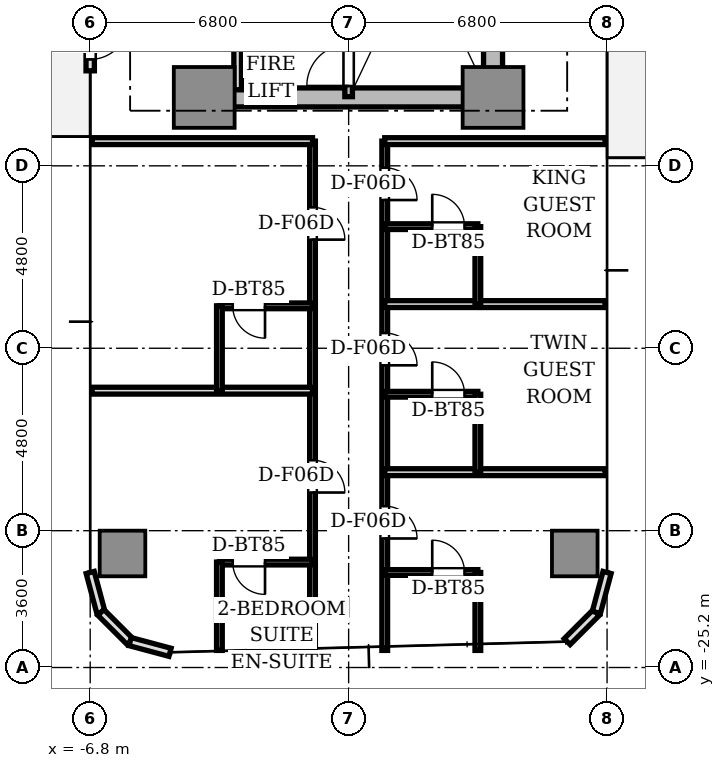
"""IFC4 building model, lengths in metres.
Left out: names, types, materials, properties, quantities, classifications, styles, units other than length and angle.
Written with IfcOpenShell. Run it as: python <this file> out.ifc"""

import sys

from ifc_helpers import new_model, si_unit, direction, frame, frame_2d, origin, origin_2d, place, context, subcontext, project, spatial, rectangle, extrude, source, transform, mapped, element, fill, save


model = new_model("IFC4")
c1 = context("Model", 3, precision=1e-05, world=origin(), true_north=direction((0.0, 1.0)))
c2 = subcontext(c1, "Body", "Model", "MODEL_VIEW")
j1 = project(units=[si_unit("LENGTHUNIT", "METRE"), si_unit("PLANEANGLEUNIT", "RADIAN")], contexts=[c1])
p1 = place(None, origin())
s1 = spatial("IfcSite", under=j1, at=p1, CompositionType="ELEMENT")
p2 = place(p1, origin())
s2 = spatial("IfcBuilding", under=s1, at=p2, CompositionType="ELEMENT")
p3 = place(p2, frame((0.0, 0.0, 64.45)))
s3 = spatial("IfcBuildingStorey", under=s2, at=p3, CompositionType="ELEMENT", Elevation=64.45)
p4 = place(p3, frame((-3.55, -10.2, 0.0), z_axis=(0.0, 0.0, 1.0), x_axis=(1.0, 0.0, 0.0)))
e1 = element("IfcWall", 1, at=p4, inside=s3, PredefinedType="SHEAR", context=c2, shape_type="SweptSolid", body=[
    extrude(rectangle(XDim=7.1, YDim=0.5, at=frame_2d((3.55, 0.0))), origin(), (0.0, 0.0, 1.0), 3.11),
])
p5 = place(p3, frame((3.8, -9.75, 0.0), z_axis=(0.0, 0.0, 1.0), x_axis=(0.0, 1.0, 0.0)))
e2 = element("IfcWall", 2, at=p5, inside=s3, PredefinedType="SHEAR", context=c2, shape_type="SweptSolid", body=[
    extrude(rectangle(XDim=6.9, YDim=0.5, at=frame_2d((3.45, 0.0))), origin(), (0.0, 0.0, 1.0), 3.11),
])
m1 = source(origin(), c2, "Body", "SweptSolid", [
    extrude(rectangle(XDim=1.6, YDim=1.6, at=origin_2d()), origin(), (0.0, 0.0, 1.0), 3.11),
])
for number, where, z_axis, x_axis in (
    (3, (-3.8, -10.2, 0.0), (0.0, 0.0, 1.0), (1.0, 0.0, 0.0)),
    (4, (3.8, -10.2, 0.0), (0.0, 0.0, 1.0), (1.0, 0.0, 0.0)),
):
    element("IfcColumn", number, at=place(p3, frame(where, z_axis=z_axis, x_axis=x_axis)), inside=s3, PredefinedType="COLUMN", context=c2, shape_type="MappedRepresentation", body=[
        mapped(m1, transform((0.0, 0.0, 0.0), scale=1.0)),
    ])
m2 = source(origin(), c2, "Body", "SweptSolid", [
    extrude(rectangle(XDim=1.2, YDim=1.2, at=origin_2d()), origin(), (0.0, 0.0, 1.0), 3.11),
])
for number, where, z_axis, x_axis in (
    (5, (-5.95, -22.2, 0.0), (0.0, 0.0, 1.0), (1.0, 0.0, 0.0)),
    (6, (5.95, -22.2, 0.0), (0.0, 0.0, 1.0), (1.0, 0.0, 0.0)),
):
    element("IfcColumn", number, at=place(p3, frame(where, z_axis=z_axis, x_axis=x_axis)), inside=s3, PredefinedType="COLUMN", context=c2, shape_type="MappedRepresentation", body=[
        mapped(m2, transform((0.0, 0.0, 0.0), scale=1.0)),
    ])
p6 = place(p3, frame((-6.8, -6.8, 0.0), z_axis=(0.0, 0.0, 1.0), x_axis=(0.0, -1.0, 0.0)))
e7 = element("IfcWall", 7, at=p6, inside=s3, PredefinedType="STANDARD", context=c2, shape_type="SweptSolid", body=[
    extrude(rectangle(XDim=2.7, YDim=0.22, at=frame_2d((1.35, 0.0))), origin(), (0.0, 0.0, 1.0), 3.11),
])
p7 = place(p6, frame((1.4, 0.0, 0.0)))
e8 = element("IfcOpeningElement", 8, at=p7, cuts=e7, PredefinedType="OPENING", context=c2, shape_type="SweptSolid", body=[
    extrude(rectangle(XDim=1.0, YDim=2.2, at=frame_2d((0.5, 1.1))), frame((0.0, 0.12, 0.0), z_axis=(0.0, -1.0, 0.0), x_axis=(1.0, 0.0, 0.0)), (0.0, 0.0, 1.0), 0.24),
])
for number, where, z_axis, x_axis in (
    (9, (-6.8, -22.7, 0.0), (0.0, 0.0, 1.0), (0.259, -0.966, 0.0)),
    (10, (-6.519, -23.75, 0.0), (0.0, 0.0, 1.0), (0.707, -0.707, 0.0)),
    (11, (-5.75, -24.519, 0.0), (0.0, 0.0, 1.0), (0.966, -0.259, 0.0)),
    (12, (5.75, -24.519, 0.0), (0.0, 0.0, 1.0), (0.707, 0.707, 0.0)),
    (13, (6.519, -23.75, 0.0), (0.0, 0.0, 1.0), (0.259, 0.966, 0.0)),
):
    element("IfcWall", number, at=place(p3, frame(where, z_axis=z_axis, x_axis=x_axis)), inside=s3, PredefinedType="STANDARD", context=c2, shape_type="SweptSolid", body=[
        extrude(rectangle(XDim=1.087, YDim=0.22, at=frame_2d((0.543, 0.0))), origin(), (0.0, 0.0, 1.0), 3.11),
    ])
p8 = place(p3, frame((0.0, -10.18, 0.0), z_axis=(0.0, 0.0, 1.0), x_axis=(0.0, 1.0, 0.0)))
e14 = element("IfcWall", 14, at=p8, inside=s3, PredefinedType="SOLIDWALL", context=c2, shape_type="SweptSolid", body=[
    extrude(rectangle(XDim=7.68, YDim=0.2, at=frame_2d((3.84, 0.0))), origin(), (0.0, 0.0, 1.0), 3.11),
])
p9 = place(p8, frame((0.28, 0.0, 0.0)))
e15 = element("IfcOpeningElement", 15, at=p9, cuts=e14, PredefinedType="OPENING", context=c2, shape_type="SweptSolid", body=[
    extrude(rectangle(XDim=1.1, YDim=2.15, at=frame_2d((0.55, 1.075))), frame((0.0, 0.11, 0.0), z_axis=(0.0, -1.0, 0.0), x_axis=(1.0, 0.0, 0.0)), (0.0, 0.0, 1.0), 0.22),
])
p10 = place(p3, frame((-2.92, -10.0, 0.0), z_axis=(0.0, 0.0, 1.0), x_axis=(0.0, 1.0, 0.0)))
e16 = element("IfcWall", 16, at=p10, inside=s3, PredefinedType="SOLIDWALL", context=c2, shape_type="SweptSolid", body=[
    extrude(rectangle(XDim=1.44, YDim=0.2, at=frame_2d((0.72, 0.0))), origin(), (0.0, 0.0, 1.0), 2.66),
])
p11 = place(p3, frame((0.95, -11.35, 0.0), z_axis=(0.0, 0.0, 1.0), x_axis=(0.0, -1.0, 0.0)))
e17 = element("IfcWall", 17, at=p11, inside=s3, PredefinedType="PARTITIONING", context=c2, shape_type="SweptSolid", body=[
    extrude(rectangle(XDim=13.4, YDim=0.15, at=frame_2d((6.7, 0.0))), origin(), (0.0, 0.0, 1.0), 2.66),
])
p12 = place(p11, frame((0.7, 0.0, 0.0)))
e18 = element("IfcOpeningElement", 18, at=p12, cuts=e17, PredefinedType="OPENING", context=c2, shape_type="SweptSolid", body=[
    extrude(rectangle(XDim=0.85, YDim=2.1, at=frame_2d((0.425, 1.05))), frame((0.0, 0.085, 0.0), z_axis=(0.0, -1.0, 0.0), x_axis=(1.0, 0.0, 0.0)), (0.0, 0.0, 1.0), 0.17),
])
p13 = place(p11, frame((5.049, 0.0, 0.0)))
e19 = element("IfcOpeningElement", 19, at=p13, cuts=e17, PredefinedType="OPENING", context=c2, shape_type="SweptSolid", body=[
    extrude(rectangle(XDim=0.85, YDim=2.1, at=frame_2d((0.425, 1.05))), frame((0.0, 0.085, 0.0), z_axis=(0.0, -1.0, 0.0), x_axis=(1.0, 0.0, 0.0)), (0.0, 0.0, 1.0), 0.17),
])
p14 = place(p11, frame((9.605, 0.0, 0.0)))
e20 = element("IfcOpeningElement", 20, at=p14, cuts=e17, PredefinedType="OPENING", context=c2, shape_type="SweptSolid", body=[
    extrude(rectangle(XDim=0.85, YDim=2.1, at=frame_2d((0.425, 1.05))), frame((0.0, 0.085, 0.0), z_axis=(0.0, -1.0, 0.0), x_axis=(1.0, 0.0, 0.0)), (0.0, 0.0, 1.0), 0.17),
])
p15 = place(p3, frame((-0.95, -11.35, 0.0), z_axis=(0.0, 0.0, 1.0), x_axis=(0.0, -1.0, 0.0)))
e21 = element("IfcWall", 21, at=p15, inside=s3, PredefinedType="PARTITIONING", context=c2, shape_type="SweptSolid", body=[
    extrude(rectangle(XDim=13.4, YDim=0.15, at=frame_2d((6.7, 0.0))), origin(), (0.0, 0.0, 1.0), 2.66),
])
p16 = place(p15, frame((1.742, 0.0, 0.0)))
e22 = element("IfcOpeningElement", 22, at=p16, cuts=e21, PredefinedType="OPENING", context=c2, shape_type="SweptSolid", body=[
    extrude(rectangle(XDim=0.85, YDim=2.1, at=frame_2d((0.425, 1.05))), frame((0.0, 0.085, 0.0), z_axis=(0.0, -1.0, 0.0), x_axis=(1.0, 0.0, 0.0)), (0.0, 0.0, 1.0), 0.17),
])
p17 = place(p15, frame((8.396, 0.0, 0.0)))
e23 = element("IfcOpeningElement", 23, at=p17, cuts=e21, PredefinedType="OPENING", context=c2, shape_type="SweptSolid", body=[
    extrude(rectangle(XDim=0.85, YDim=2.1, at=frame_2d((0.425, 1.05))), frame((0.0, 0.085, 0.0), z_axis=(0.0, -1.0, 0.0), x_axis=(1.0, 0.0, 0.0)), (0.0, 0.0, 1.0), 0.17),
])
for number, where, z_axis, x_axis in (
    (24, (0.95, -11.35, 0.0), (0.0, 0.0, 1.0), (1.0, 0.0, 0.0)),
    (25, (-6.75, -11.35, 0.0), (0.0, 0.0, 1.0), (1.0, 0.0, 0.0)),
    (26, (0.95, -15.638, 0.0), (0.0, 0.0, 1.0), (1.0, 0.0, 0.0)),
):
    element("IfcWall", number, at=place(p3, frame(where, z_axis=z_axis, x_axis=x_axis)), inside=s3, PredefinedType="PARTITIONING", context=c2, shape_type="SweptSolid", body=[
        extrude(rectangle(XDim=5.8, YDim=0.18, at=frame_2d((2.9, 0.0))), origin(), (0.0, 0.0, 1.0), 2.66),
    ])
p18 = place(p3, frame((0.95, -13.6, 0.0), z_axis=(0.0, 0.0, 1.0), x_axis=(1.0, 0.0, 0.0)))
e27 = element("IfcWall", 27, at=p18, inside=s3, PredefinedType="PARTITIONING", context=c2, shape_type="SweptSolid", body=[
    extrude(rectangle(XDim=2.45, YDim=0.15, at=frame_2d((1.225, 0.0))), origin(), (0.0, 0.0, 1.0), 2.66),
])
p19 = place(p18, frame((1.25, 0.0, 0.0)))
e28 = element("IfcOpeningElement", 28, at=p19, cuts=e27, PredefinedType="OPENING", context=c2, shape_type="SweptSolid", body=[
    extrude(rectangle(XDim=0.85, YDim=2.1, at=frame_2d((0.425, 1.05))), frame((0.0, 0.085, 0.0), z_axis=(0.0, -1.0, 0.0), x_axis=(1.0, 0.0, 0.0)), (0.0, 0.0, 1.0), 0.17),
])
p20 = place(p3, frame((3.4, -13.6, 0.0), z_axis=(0.0, 0.0, 1.0), x_axis=(0.0, -1.0, 0.0)))
e29 = element("IfcWall", 29, at=p20, inside=s3, PredefinedType="PARTITIONING", context=c2, shape_type="SweptSolid", body=[
    extrude(rectangle(XDim=2.038, YDim=0.15, at=frame_2d((1.019, 0.0))), origin(), (0.0, 0.0, 1.0), 2.66),
])
p21 = place(p3, frame((0.95, -20.06, 0.0), z_axis=(0.0, 0.0, 1.0), x_axis=(1.0, 0.0, 0.0)))
e30 = element("IfcWall", 30, at=p21, inside=s3, PredefinedType="PARTITIONING", context=c2, shape_type="SweptSolid", body=[
    extrude(rectangle(XDim=5.8, YDim=0.18, at=frame_2d((2.9, 0.0))), origin(), (0.0, 0.0, 1.0), 2.66),
])
p22 = place(p3, frame((0.95, -18.01, 0.0), z_axis=(0.0, 0.0, 1.0), x_axis=(1.0, 0.0, 0.0)))
e31 = element("IfcWall", 31, at=p22, inside=s3, PredefinedType="PARTITIONING", context=c2, shape_type="SweptSolid", body=[
    extrude(rectangle(XDim=2.45, YDim=0.15, at=frame_2d((1.225, 0.0))), origin(), (0.0, 0.0, 1.0), 2.66),
])
p23 = place(p22, frame((1.25, 0.0, 0.0)))
e32 = element("IfcOpeningElement", 32, at=p23, cuts=e31, PredefinedType="OPENING", context=c2, shape_type="SweptSolid", body=[
    extrude(rectangle(XDim=0.85, YDim=2.1, at=frame_2d((0.425, 1.05))), frame((0.0, 0.085, 0.0), z_axis=(0.0, -1.0, 0.0), x_axis=(1.0, 0.0, 0.0)), (0.0, 0.0, 1.0), 0.17),
])
p24 = place(p3, frame((3.4, -18.01, 0.0), z_axis=(0.0, 0.0, 1.0), x_axis=(0.0, -1.0, 0.0)))
e33 = element("IfcWall", 33, at=p24, inside=s3, PredefinedType="PARTITIONING", context=c2, shape_type="SweptSolid", body=[
    extrude(rectangle(XDim=2.05, YDim=0.15, at=frame_2d((1.025, 0.0))), origin(), (0.0, 0.0, 1.0), 2.66),
])
p25 = place(p3, frame((0.95, -22.7, 0.0), z_axis=(0.0, 0.0, 1.0), x_axis=(1.0, 0.0, 0.0)))
e34 = element("IfcWall", 34, at=p25, inside=s3, PredefinedType="PARTITIONING", context=c2, shape_type="SweptSolid", body=[
    extrude(rectangle(XDim=2.45, YDim=0.15, at=frame_2d((1.225, 0.0))), origin(), (0.0, 0.0, 1.0), 2.66),
])
p26 = place(p25, frame((1.25, 0.0, 0.0)))
e35 = element("IfcOpeningElement", 35, at=p26, cuts=e34, PredefinedType="OPENING", context=c2, shape_type="SweptSolid", body=[
    extrude(rectangle(XDim=0.85, YDim=2.1, at=frame_2d((0.425, 1.05))), frame((0.0, 0.085, 0.0), z_axis=(0.0, -1.0, 0.0), x_axis=(1.0, 0.0, 0.0)), (0.0, 0.0, 1.0), 0.17),
])
p27 = place(p3, frame((3.4, -22.7, 0.0), z_axis=(0.0, 0.0, 1.0), x_axis=(0.0, -1.0, 0.0)))
e36 = element("IfcWall", 36, at=p27, inside=s3, PredefinedType="PARTITIONING", context=c2, shape_type="SweptSolid", body=[
    extrude(rectangle(XDim=2.05, YDim=0.15, at=frame_2d((1.025, 0.0))), origin(), (0.0, 0.0, 1.0), 2.66),
])
p28 = place(p3, frame((-0.95, -17.916, 0.0), z_axis=(0.0, 0.0, 1.0), x_axis=(-1.0, 0.0, 0.0)))
e37 = element("IfcWall", 37, at=p28, inside=s3, PredefinedType="PARTITIONING", context=c2, shape_type="SweptSolid", body=[
    extrude(rectangle(XDim=5.8, YDim=0.18, at=frame_2d((2.9, 0.0))), origin(), (0.0, 0.0, 1.0), 2.66),
])
p29 = place(p3, frame((-0.95, -15.684, 0.0), z_axis=(0.0, 0.0, 1.0), x_axis=(-1.0, 0.0, 0.0)))
e38 = element("IfcWall", 38, at=p29, inside=s3, PredefinedType="PARTITIONING", context=c2, shape_type="SweptSolid", body=[
    extrude(rectangle(XDim=2.45, YDim=0.15, at=frame_2d((1.225, 0.0))), origin(), (0.0, 0.0, 1.0), 2.66),
])
p30 = place(p29, frame((1.25, 0.0, 0.0)))
e39 = element("IfcOpeningElement", 39, at=p30, cuts=e38, PredefinedType="OPENING", context=c2, shape_type="SweptSolid", body=[
    extrude(rectangle(XDim=0.85, YDim=2.1, at=frame_2d((0.425, 1.05))), frame((0.0, 0.085, 0.0), z_axis=(0.0, -1.0, 0.0), x_axis=(1.0, 0.0, 0.0)), (0.0, 0.0, 1.0), 0.17),
])
p31 = place(p3, frame((-3.4, -15.684, 0.0), z_axis=(0.0, 0.0, 1.0), x_axis=(0.0, -1.0, 0.0)))
e40 = element("IfcWall", 40, at=p31, inside=s3, PredefinedType="PARTITIONING", context=c2, shape_type="SweptSolid", body=[
    extrude(rectangle(XDim=2.232, YDim=0.15, at=frame_2d((1.116, 0.0))), origin(), (0.0, 0.0, 1.0), 2.66),
])
p32 = place(p3, frame((-0.95, -22.426, 0.0), z_axis=(0.0, 0.0, 1.0), x_axis=(-1.0, 0.0, 0.0)))
e41 = element("IfcWall", 41, at=p32, inside=s3, PredefinedType="PARTITIONING", context=c2, shape_type="SweptSolid", body=[
    extrude(rectangle(XDim=2.45, YDim=0.15, at=frame_2d((1.225, 0.0))), origin(), (0.0, 0.0, 1.0), 2.58),
])
p33 = place(p32, frame((1.25, 0.0, 0.0)))
e42 = element("IfcOpeningElement", 42, at=p33, cuts=e41, PredefinedType="OPENING", context=c2, shape_type="SweptSolid", body=[
    extrude(rectangle(XDim=0.85, YDim=2.1, at=frame_2d((0.425, 1.05))), frame((0.0, 0.085, 0.0), z_axis=(0.0, -1.0, 0.0), x_axis=(1.0, 0.0, 0.0)), (0.0, 0.0, 1.0), 0.17),
])
p34 = place(p3, frame((-3.4, -22.426, 0.0), z_axis=(0.0, 0.0, 1.0), x_axis=(0.0, -1.0, 0.0)))
e43 = element("IfcWall", 43, at=p34, inside=s3, PredefinedType="PARTITIONING", context=c2, shape_type="SweptSolid", body=[
    extrude(rectangle(XDim=2.324, YDim=0.15, at=frame_2d((1.162, 0.0))), origin(), (0.0, 0.0, 1.0), 2.66),
])
m3 = source(origin(), c2, "Body", "SweptSolid", [
    extrude(rectangle(XDim=1.0, YDim=0.05, at=origin_2d()), origin(), (0.0, 0.0, 1.0), 2.2),
])
p35 = place(p7, frame((0.5, 0.0, 0.0)))
e44 = element("IfcDoor", 44, at=p35, inside=s3, OperationType="SINGLE_SWING_LEFT", PredefinedType="DOOR", context=c2, shape_type="MappedRepresentation", body=[
    mapped(m3, transform((0.0, 0.0, 0.0), scale=1.0)),
])
fill(e8, e44)
m4 = source(origin(), c2, "Body", "SweptSolid", [
    extrude(rectangle(XDim=1.1, YDim=0.05, at=origin_2d()), origin(), (0.0, 0.0, 1.0), 2.15),
])
p36 = place(p9, frame((0.55, 0.0, 0.0)))
e45 = element("IfcDoor", 45, at=p36, inside=s3, OperationType="SINGLE_SWING_LEFT", PredefinedType="DOOR", context=c2, shape_type="MappedRepresentation", body=[
    mapped(m4, transform((0.0, 0.0, 0.0), scale=1.0)),
])
fill(e15, e45)
m5 = source(origin(), c2, "Body", "SweptSolid", [
    extrude(rectangle(XDim=0.85, YDim=0.05, at=origin_2d()), origin(), (0.0, 0.0, 1.0), 2.1),
])
p37 = place(p19, frame((0.425, 0.0, 0.0)))
e46 = element("IfcDoor", 46, at=p37, inside=s3, OperationType="SINGLE_SWING_LEFT", PredefinedType="DOOR", context=c2, shape_type="MappedRepresentation", body=[
    mapped(m5, transform((0.0, 0.0, 0.0), scale=1.0)),
])
fill(e28, e46)
p38 = place(p12, frame((0.425, 0.0, 0.0)))
e47 = element("IfcDoor", 47, at=p38, inside=s3, OperationType="SINGLE_SWING_RIGHT", PredefinedType="DOOR", context=c2, shape_type="MappedRepresentation", body=[
    mapped(m5, transform((0.0, 0.0, 0.0), scale=1.0)),
])
fill(e18, e47)
p39 = place(p23, frame((0.425, 0.0, 0.0)))
e48 = element("IfcDoor", 48, at=p39, inside=s3, OperationType="SINGLE_SWING_LEFT", PredefinedType="DOOR", context=c2, shape_type="MappedRepresentation", body=[
    mapped(m5, transform((0.0, 0.0, 0.0), scale=1.0)),
])
fill(e32, e48)
p40 = place(p13, frame((0.425, 0.0, 0.0)))
e49 = element("IfcDoor", 49, at=p40, inside=s3, OperationType="SINGLE_SWING_RIGHT", PredefinedType="DOOR", context=c2, shape_type="MappedRepresentation", body=[
    mapped(m5, transform((0.0, 0.0, 0.0), scale=1.0)),
])
fill(e19, e49)
p41 = place(p26, frame((0.425, 0.0, 0.0)))
e50 = element("IfcDoor", 50, at=p41, inside=s3, OperationType="SINGLE_SWING_LEFT", PredefinedType="DOOR", context=c2, shape_type="MappedRepresentation", body=[
    mapped(m5, transform((0.0, 0.0, 0.0), scale=1.0)),
])
fill(e35, e50)
p42 = place(p14, frame((0.425, 0.0, 0.0)))
e51 = element("IfcDoor", 51, at=p42, inside=s3, OperationType="SINGLE_SWING_RIGHT", PredefinedType="DOOR", context=c2, shape_type="MappedRepresentation", body=[
    mapped(m5, transform((0.0, 0.0, 0.0), scale=1.0)),
])
fill(e20, e51)
p43 = place(p30, frame((0.425, 0.0, 0.0)))
e52 = element("IfcDoor", 52, at=p43, inside=s3, OperationType="SINGLE_SWING_LEFT", PredefinedType="DOOR", context=c2, shape_type="MappedRepresentation", body=[
    mapped(m5, transform((0.0, 0.0, 0.0), scale=1.0)),
])
fill(e39, e52)
p44 = place(p16, frame((0.425, 0.0, 0.0)))
e53 = element("IfcDoor", 53, at=p44, inside=s3, OperationType="SINGLE_SWING_RIGHT", PredefinedType="DOOR", context=c2, shape_type="MappedRepresentation", body=[
    mapped(m5, transform((0.0, 0.0, 0.0), scale=1.0)),
])
fill(e22, e53)
p45 = place(p33, frame((0.425, 0.0, 0.0)))
e54 = element("IfcDoor", 54, at=p45, inside=s3, OperationType="SINGLE_SWING_LEFT", PredefinedType="DOOR", context=c2, shape_type="MappedRepresentation", body=[
    mapped(m5, transform((0.0, 0.0, 0.0), scale=1.0)),
])
fill(e42, e54)
p46 = place(p17, frame((0.425, 0.0, 0.0)))
e55 = element("IfcDoor", 55, at=p46, inside=s3, OperationType="SINGLE_SWING_RIGHT", PredefinedType="DOOR", context=c2, shape_type="MappedRepresentation", body=[
    mapped(m5, transform((0.0, 0.0, 0.0), scale=1.0)),
])
fill(e23, e55)
save(model, sys.argv[1])
